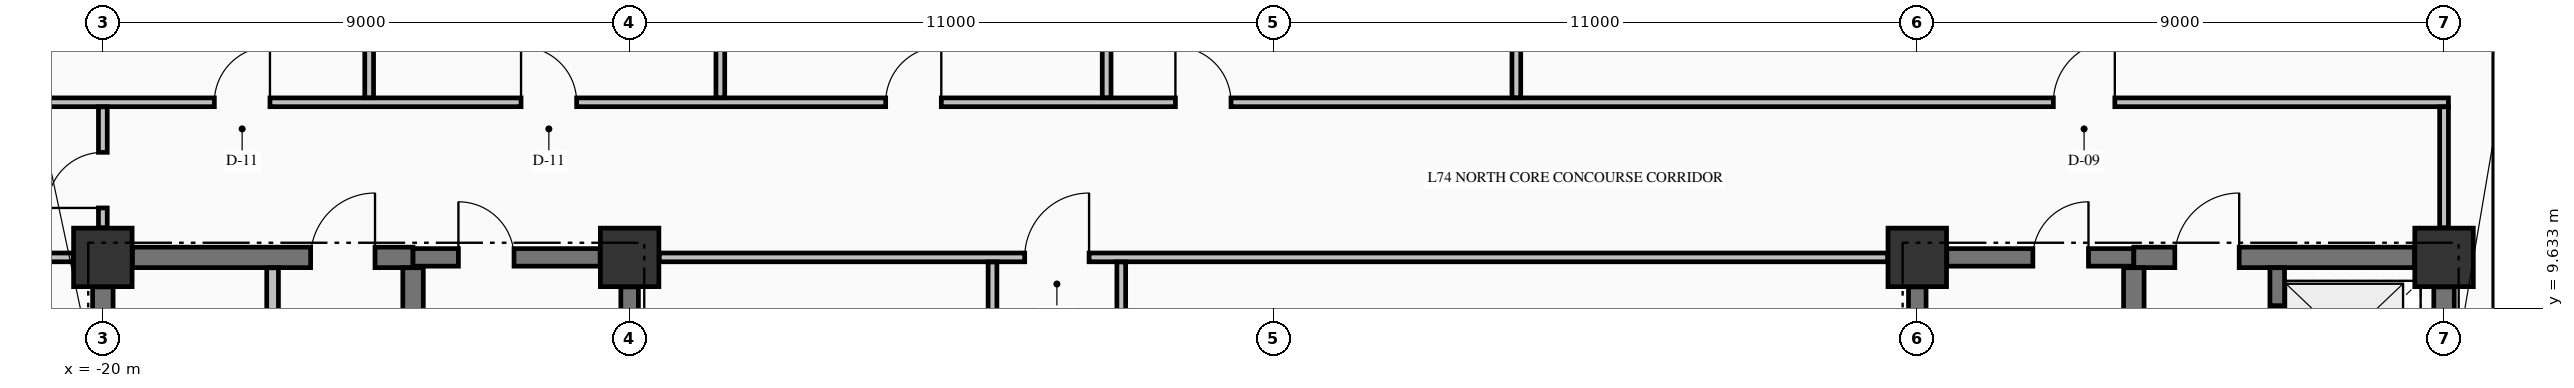
"""IFC4 building model, lengths in metres.
Left out: names, types, materials, properties, quantities, classifications, styles, units other than length and angle.
Written with IfcOpenShell. Run it as: python <this file> out.ifc"""

import sys

from ifc_helpers import new_model, si_unit, direction, frame, frame_2d, origin, origin_2d, place, context, subcontext, project, spatial, rectangle, extrude, element, fill, save


model = new_model("IFC4")
c1 = context("Model", 3, precision=1e-05, world=origin(), true_north=direction((0.0, 1.0)))
c2 = subcontext(c1, "Body", "Model", "MODEL_VIEW")
j1 = project(units=[si_unit("LENGTHUNIT", "METRE"), si_unit("PLANEANGLEUNIT", "RADIAN")], contexts=[c1])
p1 = place(None, origin())
s1 = spatial("IfcSite", under=j1, at=p1, CompositionType="ELEMENT")
p2 = place(p1, origin())
s2 = spatial("IfcBuilding", under=s1, at=p2, CompositionType="ELEMENT")
p3 = place(p2, frame((0.0, 0.0, 278.06)))
s3 = spatial("IfcBuildingStorey", under=s2, at=p3, CompositionType="ELEMENT", Elevation=278.06)
for number, where, z_axis, x_axis in (
    (1, (-20.0, 10.5, -0.425), (0.0, 0.0, 1.0), (1.0, 0.0, 0.0)),
    (2, (-11.0, 10.5, -0.425), (0.0, 0.0, 1.0), (1.0, 0.0, 0.0)),
    (3, (11.0, 10.5, -0.425), (0.0, 0.0, 1.0), (1.0, 0.0, 0.0)),
    (4, (20.0, 10.5, -0.425), (0.0, 0.0, 1.0), (1.0, 0.0, 0.0)),
):
    element("IfcColumn", number, at=place(p3, frame(where, z_axis=z_axis, x_axis=x_axis)), inside=s3, PredefinedType="COLUMN", context=c2, shape_type="SweptSolid", body=[
        extrude(rectangle(XDim=1.0, YDim=1.0, at=origin_2d()), origin(), (0.0, 0.0, 1.0), 3.84),
    ])
p4 = place(p3, frame((21.0, 9.455, 0.0), z_axis=(0.0, 0.0, 1.0), x_axis=(0.0, 1.0, 0.0)))
e5 = element("IfcWall", 5, at=p4, inside=s3, PredefinedType="STANDARD", context=c2, shape_type="SweptSolid", body=[
    extrude(rectangle(XDim=8.09, YDim=0.3, at=frame_2d((4.045, 0.0))), origin(), (0.0, 0.0, 1.0), 1.607),
])
p5 = place(p3, frame((-19.496, 10.5, 0.0), z_axis=(0.0, 0.0, 1.0), x_axis=(1.0, 0.0, 0.0)))
e6 = element("IfcWall", 6, at=p5, inside=s3, PredefinedType="SHEAR", context=c2, shape_type="SweptSolid", body=[
    extrude(rectangle(XDim=4.796, YDim=0.35, at=frame_2d((2.398, 0.0))), origin(), (0.0, 0.0, 1.0), 3.415),
])
p6 = place(p5, frame((3.046, 0.0, 0.0)))
e7 = element("IfcOpeningElement", 7, at=p6, cuts=e6, PredefinedType="OPENING", context=c2, shape_type="SweptSolid", body=[
    extrude(rectangle(XDim=1.1, YDim=2.15, at=frame_2d((0.55, 1.075))), frame((0.0, 0.185, 0.0), z_axis=(0.0, -1.0, 0.0), x_axis=(1.0, 0.0, 0.0)), (0.0, 0.0, 1.0), 0.37),
])
p7 = place(p3, frame((-14.7, 10.5, 0.0), z_axis=(0.0, 0.0, 1.0), x_axis=(1.0, 0.0, 0.0)))
e8 = element("IfcWall", 8, at=p7, inside=s3, PredefinedType="SHEAR", context=c2, shape_type="SweptSolid", body=[
    extrude(rectangle(XDim=3.196, YDim=0.3, at=frame_2d((1.598, 0.0))), origin(), (0.0, 0.0, 1.0), 3.415),
])
p8 = place(p7, frame((0.775, 0.0, 0.0)))
e9 = element("IfcOpeningElement", 9, at=p8, cuts=e8, PredefinedType="OPENING", context=c2, shape_type="SweptSolid", body=[
    extrude(rectangle(XDim=0.95, YDim=2.15, at=frame_2d((0.475, 1.075))), frame((0.0, 0.16, 0.0), z_axis=(0.0, -1.0, 0.0), x_axis=(1.0, 0.0, 0.0)), (0.0, 0.0, 1.0), 0.32),
])
p9 = place(p3, frame((11.504, 10.5, 0.0), z_axis=(0.0, 0.0, 1.0), x_axis=(1.0, 0.0, 0.0)))
e10 = element("IfcWall", 10, at=p9, inside=s3, PredefinedType="SHEAR", context=c2, shape_type="SweptSolid", body=[
    extrude(rectangle(XDim=3.196, YDim=0.3, at=frame_2d((1.598, 0.0))), origin(), (0.0, 0.0, 1.0), 3.415),
])
p10 = place(p9, frame((1.471, 0.0, 0.0)))
e11 = element("IfcOpeningElement", 11, at=p10, cuts=e10, PredefinedType="OPENING", context=c2, shape_type="SweptSolid", body=[
    extrude(rectangle(XDim=0.95, YDim=2.15, at=frame_2d((0.475, 1.075))), frame((0.0, 0.16, 0.0), z_axis=(0.0, -1.0, 0.0), x_axis=(1.0, 0.0, 0.0)), (0.0, 0.0, 1.0), 0.32),
])
p11 = place(p3, frame((14.7, 10.5, 0.0), z_axis=(0.0, 0.0, 1.0), x_axis=(1.0, 0.0, 0.0)))
e12 = element("IfcWall", 12, at=p11, inside=s3, PredefinedType="SHEAR", context=c2, shape_type="SweptSolid", body=[
    extrude(rectangle(XDim=4.796, YDim=0.35, at=frame_2d((2.398, 0.0))), origin(), (0.0, 0.0, 1.0), 3.415),
])
p12 = place(p11, frame((0.7, 0.0, 0.0)))
e13 = element("IfcOpeningElement", 13, at=p12, cuts=e12, PredefinedType="OPENING", context=c2, shape_type="SweptSolid", body=[
    extrude(rectangle(XDim=1.1, YDim=2.15, at=frame_2d((0.55, 1.075))), frame((0.0, 0.185, 0.0), z_axis=(0.0, -1.0, 0.0), x_axis=(1.0, 0.0, 0.0)), (0.0, 0.0, 1.0), 0.37),
])
p13 = place(p3, frame((-25.835, 10.5, 0.0), z_axis=(0.0, 0.0, 1.0), x_axis=(1.0, 0.0, 0.0)))
e14 = element("IfcWall", 14, at=p13, inside=s3, PredefinedType="PARTITIONING", context=c2, shape_type="SweptSolid", body=[
    extrude(rectangle(XDim=5.329, YDim=0.15, at=frame_2d((2.665, 0.0))), origin(), (0.0, 0.0, 1.0), 3.415),
])
p14 = place(p13, frame((2.36, 0.0, 0.0)))
e15 = element("IfcOpeningElement", 15, at=p14, cuts=e14, PredefinedType="OPENING", context=c2, shape_type="SweptSolid", body=[
    extrude(rectangle(XDim=0.95, YDim=2.15, at=frame_2d((0.475, 1.075))), frame((0.0, 0.085, 0.0), z_axis=(0.0, -1.0, 0.0), x_axis=(1.0, 0.0, 0.0)), (0.0, 0.0, 1.0), 0.17),
])
p15 = place(p3, frame((-10.494, 10.5, 0.0), z_axis=(0.0, 0.0, 1.0), x_axis=(1.0, 0.0, 0.0)))
e16 = element("IfcWall", 16, at=p15, inside=s3, PredefinedType="PARTITIONING", context=c2, shape_type="SweptSolid", body=[
    extrude(rectangle(XDim=20.988, YDim=0.15, at=frame_2d((10.494, 0.0))), origin(), (0.0, 0.0, 1.0), 3.415),
])
p16 = place(p15, frame((6.244, 0.0, 0.0)))
e17 = element("IfcOpeningElement", 17, at=p16, cuts=e16, PredefinedType="OPENING", context=c2, shape_type="SweptSolid", body=[
    extrude(rectangle(XDim=1.1, YDim=2.15, at=frame_2d((0.55, 1.075))), frame((0.0, 0.085, 0.0), z_axis=(0.0, -1.0, 0.0), x_axis=(1.0, 0.0, 0.0)), (0.0, 0.0, 1.0), 0.17),
])
p17 = place(p3, frame((-25.835, 13.15, 0.0), z_axis=(0.0, 0.0, 1.0), x_axis=(1.0, 0.0, 0.0)))
e18 = element("IfcWall", 18, at=p17, inside=s3, PredefinedType="PARTITIONING", context=c2, shape_type="SweptSolid", body=[
    extrude(rectangle(XDim=45.91, YDim=0.15, at=frame_2d((22.955, 0.0))), origin(), (0.0, 0.0, 1.0), 3.415),
])
p18 = place(p17, frame((7.74, 0.0, 0.0)))
e19 = element("IfcOpeningElement", 19, at=p18, cuts=e18, PredefinedType="OPENING", context=c2, shape_type="SweptSolid", body=[
    extrude(rectangle(XDim=0.95, YDim=2.15, at=frame_2d((0.475, 1.075))), frame((0.0, 0.085, 0.0), z_axis=(0.0, -1.0, 0.0), x_axis=(1.0, 0.0, 0.0)), (0.0, 0.0, 1.0), 0.17),
])
p19 = place(p17, frame((12.98, 0.0, 0.0)))
e20 = element("IfcOpeningElement", 20, at=p19, cuts=e18, PredefinedType="OPENING", context=c2, shape_type="SweptSolid", body=[
    extrude(rectangle(XDim=0.95, YDim=2.15, at=frame_2d((0.475, 1.075))), frame((0.0, 0.085, 0.0), z_axis=(0.0, -1.0, 0.0), x_axis=(1.0, 0.0, 0.0)), (0.0, 0.0, 1.0), 0.17),
])
p20 = place(p17, frame((19.21, 0.0, 0.0)))
e21 = element("IfcOpeningElement", 21, at=p20, cuts=e18, PredefinedType="OPENING", context=c2, shape_type="SweptSolid", body=[
    extrude(rectangle(XDim=0.95, YDim=2.15, at=frame_2d((0.475, 1.075))), frame((0.0, 0.085, 0.0), z_axis=(0.0, -1.0, 0.0), x_axis=(1.0, 0.0, 0.0)), (0.0, 0.0, 1.0), 0.17),
])
p21 = place(p17, frame((24.16, 0.0, 0.0)))
e22 = element("IfcOpeningElement", 22, at=p21, cuts=e18, PredefinedType="OPENING", context=c2, shape_type="SweptSolid", body=[
    extrude(rectangle(XDim=0.95, YDim=2.15, at=frame_2d((0.475, 1.075))), frame((0.0, 0.085, 0.0), z_axis=(0.0, -1.0, 0.0), x_axis=(1.0, 0.0, 0.0)), (0.0, 0.0, 1.0), 0.17),
])
p22 = place(p17, frame((39.16, 0.0, 0.0)))
e23 = element("IfcOpeningElement", 23, at=p22, cuts=e18, PredefinedType="OPENING", context=c2, shape_type="SweptSolid", body=[
    extrude(rectangle(XDim=1.05, YDim=2.15, at=frame_2d((0.525, 1.075))), frame((0.0, 0.085, 0.0), z_axis=(0.0, -1.0, 0.0), x_axis=(1.0, 0.0, 0.0)), (0.0, 0.0, 1.0), 0.17),
])
p23 = place(p3, frame((-20.0, 5.327, 0.0), z_axis=(0.0, 0.0, 1.0), x_axis=(0.0, 1.0, 0.0)))
e24 = element("IfcWall", 24, at=p23, inside=s3, PredefinedType="SHEAR", context=c2, shape_type="SweptSolid", body=[
    extrude(rectangle(XDim=4.669, YDim=0.35, at=frame_2d((2.334, 0.0))), origin(), (0.0, 0.0, 1.0), 3.415),
])
p24 = place(p3, frame((-14.7, 5.852, 0.0), z_axis=(0.0, 0.0, 1.0), x_axis=(0.0, 1.0, 0.0)))
e25 = element("IfcWall", 25, at=p24, inside=s3, PredefinedType="SHEAR", context=c2, shape_type="SweptSolid", body=[
    extrude(rectangle(XDim=4.471, YDim=0.35, at=frame_2d((2.235, 0.0))), origin(), (0.0, 0.0, 1.0), 3.415),
])
for number, where, z_axis, x_axis in (
    (26, (-11.0, 5.852, 0.0), (0.0, 0.0, 1.0), (0.0, 1.0, 0.0)),
    (27, (11.0, 5.852, 0.0), (0.0, 0.0, 1.0), (0.0, 1.0, 0.0)),
):
    element("IfcWall", number, at=place(p3, frame(where, z_axis=z_axis, x_axis=x_axis)), inside=s3, PredefinedType="SHEAR", context=c2, shape_type="SweptSolid", body=[
        extrude(rectangle(XDim=4.144, YDim=0.3, at=frame_2d((2.072, 0.0))), origin(), (0.0, 0.0, 1.0), 3.415),
    ])
p25 = place(p3, frame((14.7, 5.852, 0.0), z_axis=(0.0, 0.0, 1.0), x_axis=(0.0, 1.0, 0.0)))
e28 = element("IfcWall", 28, at=p25, inside=s3, PredefinedType="SHEAR", context=c2, shape_type="SweptSolid", body=[
    extrude(rectangle(XDim=4.471, YDim=0.35, at=frame_2d((2.235, 0.0))), origin(), (0.0, 0.0, 1.0), 3.415),
])
p26 = place(p3, frame((17.15, 7.877, 0.0), z_axis=(0.0, 0.0, 1.0), x_axis=(0.0, 1.0, 0.0)))
e29 = element("IfcWall", 29, at=p26, inside=s3, PredefinedType="SOLIDWALL", context=c2, shape_type="SweptSolid", body=[
    extrude(rectangle(XDim=2.446, YDim=0.25, at=frame_2d((1.223, 0.0))), origin(), (0.0, 0.0, 1.0), 3.415),
])
p27 = place(p26, frame((0.698, 0.0, 0.0)))
e30 = element("IfcOpeningElement", 30, at=p27, cuts=e29, PredefinedType="OPENING", context=c2, shape_type="SweptSolid", body=[
    extrude(rectangle(XDim=1.1, YDim=2.2, at=frame_2d((0.55, 1.1))), frame((0.0, 0.135, 0.0), z_axis=(0.0, -1.0, 0.0), x_axis=(1.0, 0.0, 0.0)), (0.0, 0.0, 1.0), 0.27),
])
p28 = place(p3, frame((20.0, 7.877, 0.0), z_axis=(0.0, 0.0, 1.0), x_axis=(0.0, 1.0, 0.0)))
e31 = element("IfcWall", 31, at=p28, inside=s3, PredefinedType="SHEAR", context=c2, shape_type="SweptSolid", body=[
    extrude(rectangle(XDim=2.119, YDim=0.35, at=frame_2d((1.06, 0.0))), origin(), (0.0, 0.0, 1.0), 3.415),
])
p29 = place(p3, frame((-20.0, 11.006, 0.0), z_axis=(0.0, 0.0, 1.0), x_axis=(0.0, 1.0, 0.0)))
e32 = element("IfcWall", 32, at=p29, inside=s3, PredefinedType="PARTITIONING", context=c2, shape_type="SweptSolid", body=[
    extrude(rectangle(XDim=2.066, YDim=0.15, at=frame_2d((1.033, 0.0))), origin(), (0.0, 0.0, 1.0), 3.415),
])
p30 = place(p29, frame((0.339, 0.0, 0.0)))
e33 = element("IfcOpeningElement", 33, at=p30, cuts=e32, PredefinedType="OPENING", context=c2, shape_type="SweptSolid", body=[
    extrude(rectangle(XDim=0.95, YDim=2.15, at=frame_2d((0.475, 1.075))), frame((0.0, 0.085, 0.0), z_axis=(0.0, -1.0, 0.0), x_axis=(1.0, 0.0, 0.0)), (0.0, 0.0, 1.0), 0.17),
])
p31 = place(p3, frame((-17.1, 5.328, 0.0), z_axis=(0.0, 0.0, 1.0), x_axis=(0.0, 1.0, 0.0)))
e34 = element("IfcWall", 34, at=p31, inside=s3, PredefinedType="PARTITIONING", context=c2, shape_type="SweptSolid", body=[
    extrude(rectangle(XDim=4.994, YDim=0.2, at=frame_2d((2.497, 0.0))), origin(), (0.0, 0.0, 1.0), 3.415),
])
p32 = place(p31, frame((2.072, 0.0, 0.0)))
e35 = element("IfcOpeningElement", 35, at=p32, cuts=e34, PredefinedType="OPENING", context=c2, shape_type="SweptSolid", body=[
    extrude(rectangle(XDim=0.9, YDim=2.15, at=frame_2d((0.45, 1.075))), frame((0.0, 0.11, 0.0), z_axis=(0.0, -1.0, 0.0), x_axis=(1.0, 0.0, 0.0)), (0.0, 0.0, 1.0), 0.22),
])
for number, where, z_axis, x_axis in (
    (36, (-15.45, 13.228, 0.0), (0.0, 0.0, 1.0), (0.0, 1.0, 0.0)),
    (37, (-9.45, 13.228, 0.0), (0.0, 0.0, 1.0), (0.0, 1.0, 0.0)),
):
    element("IfcWall", number, at=place(p3, frame(where, z_axis=z_axis, x_axis=x_axis)), inside=s3, PredefinedType="PARTITIONING", context=c2, shape_type="SweptSolid", body=[
        extrude(rectangle(XDim=10.107, YDim=0.15, at=frame_2d((5.053, 0.0))), origin(), (0.0, 0.0, 1.0), 3.415),
    ])
p33 = place(p3, frame((-4.8, 2.978, 0.0), z_axis=(0.0, 0.0, 1.0), x_axis=(0.0, 1.0, 0.0)))
e38 = element("IfcWall", 38, at=p33, inside=s3, PredefinedType="PARTITIONING", context=c2, shape_type="SweptSolid", body=[
    extrude(rectangle(XDim=7.444, YDim=0.15, at=frame_2d((3.722, 0.0))), origin(), (0.0, 0.0, 1.0), 3.415),
])
p34 = place(p3, frame((-2.85, 13.228, 0.0), z_axis=(0.0, 0.0, 1.0), x_axis=(0.0, 1.0, 0.0)))
e39 = element("IfcWall", 39, at=p34, inside=s3, PredefinedType="PARTITIONING", context=c2, shape_type="SweptSolid", body=[
    extrude(rectangle(XDim=10.107, YDim=0.15, at=frame_2d((5.053, 0.0))), origin(), (0.0, 0.0, 1.0), 3.415),
])
p35 = place(p3, frame((-2.6, 2.978, 0.0), z_axis=(0.0, 0.0, 1.0), x_axis=(0.0, 1.0, 0.0)))
e40 = element("IfcWall", 40, at=p35, inside=s3, PredefinedType="PARTITIONING", context=c2, shape_type="SweptSolid", body=[
    extrude(rectangle(XDim=7.444, YDim=0.15, at=frame_2d((3.722, 0.0))), origin(), (0.0, 0.0, 1.0), 3.415),
])
p36 = place(p3, frame((4.15, 13.228, 0.0), z_axis=(0.0, 0.0, 1.0), x_axis=(0.0, 1.0, 0.0)))
e41 = element("IfcWall", 41, at=p36, inside=s3, PredefinedType="PARTITIONING", context=c2, shape_type="SweptSolid", body=[
    extrude(rectangle(XDim=10.107, YDim=0.15, at=frame_2d((5.053, 0.0))), origin(), (0.0, 0.0, 1.0), 3.415),
])
p37 = place(p3, frame((20.0, 11.006, 0.0), z_axis=(0.0, 0.0, 1.0), x_axis=(0.0, 1.0, 0.0)))
e42 = element("IfcWall", 42, at=p37, inside=s3, PredefinedType="PARTITIONING", context=c2, shape_type="SweptSolid", body=[
    extrude(rectangle(XDim=2.066, YDim=0.15, at=frame_2d((1.033, 0.0))), origin(), (0.0, 0.0, 1.0), 3.005),
])
p38 = place(p8, origin())
e43 = element("IfcDoor", 43, at=p38, inside=s3, OperationType="SINGLE_SWING_LEFT", PredefinedType="DOOR", context=c2, shape_type="SweptSolid", body=[
    extrude(rectangle(XDim=0.95, YDim=2.15, at=frame_2d((0.475, 1.075))), frame((0.0, 0.025, 0.0), z_axis=(0.0, -1.0, 0.0), x_axis=(1.0, 0.0, 0.0)), (0.0, 0.0, 1.0), 0.05),
])
fill(e9, e43)
p39 = place(p10, origin())
e44 = element("IfcDoor", 44, at=p39, inside=s3, OperationType="SINGLE_SWING_RIGHT", PredefinedType="DOOR", context=c2, shape_type="SweptSolid", body=[
    extrude(rectangle(XDim=0.95, YDim=2.15, at=frame_2d((0.475, 1.075))), frame((0.0, 0.025, 0.0), z_axis=(0.0, -1.0, 0.0), x_axis=(1.0, 0.0, 0.0)), (0.0, 0.0, 1.0), 0.05),
])
fill(e11, e44)
p40 = place(p6, origin())
e45 = element("IfcDoor", 45, at=p40, inside=s3, OperationType="SINGLE_SWING_RIGHT", PredefinedType="DOOR", context=c2, shape_type="SweptSolid", body=[
    extrude(rectangle(XDim=1.1, YDim=2.15, at=frame_2d((0.55, 1.075))), frame((0.0, 0.025, 0.0), z_axis=(0.0, -1.0, 0.0), x_axis=(1.0, 0.0, 0.0)), (0.0, 0.0, 1.0), 0.05),
])
fill(e7, e45)
p41 = place(p27, origin())
e46 = element("IfcDoor", 46, at=p41, inside=s3, OperationType="SLIDING_TO_RIGHT", PredefinedType="DOOR", context=c2, shape_type="SweptSolid", body=[
    extrude(rectangle(XDim=1.1, YDim=2.2, at=frame_2d((0.55, 1.1))), frame((0.0, 0.025, 0.0), z_axis=(0.0, -1.0, 0.0), x_axis=(1.0, 0.0, 0.0)), (0.0, 0.0, 1.0), 0.05),
])
fill(e30, e46)
p42 = place(p12, origin())
e47 = element("IfcDoor", 47, at=p42, inside=s3, OperationType="SINGLE_SWING_RIGHT", PredefinedType="DOOR", context=c2, shape_type="SweptSolid", body=[
    extrude(rectangle(XDim=1.1, YDim=2.15, at=frame_2d((0.55, 1.075))), frame((0.0, 0.025, 0.0), z_axis=(0.0, -1.0, 0.0), x_axis=(1.0, 0.0, 0.0)), (0.0, 0.0, 1.0), 0.05),
])
fill(e13, e47)
p43 = place(p16, origin())
e48 = element("IfcDoor", 48, at=p43, inside=s3, OperationType="SINGLE_SWING_RIGHT", PredefinedType="DOOR", context=c2, shape_type="SweptSolid", body=[
    extrude(rectangle(XDim=1.1, YDim=2.15, at=frame_2d((0.55, 1.075))), frame((0.0, 0.025, 0.0), z_axis=(0.0, -1.0, 0.0), x_axis=(1.0, 0.0, 0.0)), (0.0, 0.0, 1.0), 0.05),
])
fill(e17, e48)
p44 = place(p18, origin())
e49 = element("IfcDoor", 49, at=p44, inside=s3, OperationType="SINGLE_SWING_RIGHT", PredefinedType="DOOR", context=c2, shape_type="SweptSolid", body=[
    extrude(rectangle(XDim=0.95, YDim=2.15, at=frame_2d((0.475, 1.075))), frame((0.0, 0.025, 0.0), z_axis=(0.0, -1.0, 0.0), x_axis=(1.0, 0.0, 0.0)), (0.0, 0.0, 1.0), 0.05),
])
fill(e19, e49)
p45 = place(p19, origin())
e50 = element("IfcDoor", 50, at=p45, inside=s3, OperationType="SINGLE_SWING_LEFT", PredefinedType="DOOR", context=c2, shape_type="SweptSolid", body=[
    extrude(rectangle(XDim=0.95, YDim=2.15, at=frame_2d((0.475, 1.075))), frame((0.0, 0.025, 0.0), z_axis=(0.0, -1.0, 0.0), x_axis=(1.0, 0.0, 0.0)), (0.0, 0.0, 1.0), 0.05),
])
fill(e20, e50)
p46 = place(p20, origin())
e51 = element("IfcDoor", 51, at=p46, inside=s3, OperationType="SINGLE_SWING_RIGHT", PredefinedType="DOOR", context=c2, shape_type="SweptSolid", body=[
    extrude(rectangle(XDim=0.95, YDim=2.15, at=frame_2d((0.475, 1.075))), frame((0.0, 0.025, 0.0), z_axis=(0.0, -1.0, 0.0), x_axis=(1.0, 0.0, 0.0)), (0.0, 0.0, 1.0), 0.05),
])
fill(e21, e51)
p47 = place(p21, origin())
e52 = element("IfcDoor", 52, at=p47, inside=s3, OperationType="SINGLE_SWING_LEFT", PredefinedType="DOOR", context=c2, shape_type="SweptSolid", body=[
    extrude(rectangle(XDim=0.95, YDim=2.15, at=frame_2d((0.475, 1.075))), frame((0.0, 0.025, 0.0), z_axis=(0.0, -1.0, 0.0), x_axis=(1.0, 0.0, 0.0)), (0.0, 0.0, 1.0), 0.05),
])
fill(e22, e52)
p48 = place(p22, origin())
e53 = element("IfcDoor", 53, at=p48, inside=s3, OperationType="SINGLE_SWING_RIGHT", PredefinedType="DOOR", context=c2, shape_type="SweptSolid", body=[
    extrude(rectangle(XDim=1.05, YDim=2.15, at=frame_2d((0.525, 1.075))), frame((0.0, 0.025, 0.0), z_axis=(0.0, -1.0, 0.0), x_axis=(1.0, 0.0, 0.0)), (0.0, 0.0, 1.0), 0.05),
])
fill(e23, e53)
p49 = place(p30, origin())
e54 = element("IfcDoor", 54, at=p49, inside=s3, OperationType="SINGLE_SWING_LEFT", PredefinedType="DOOR", context=c2, shape_type="SweptSolid", body=[
    extrude(rectangle(XDim=0.95, YDim=2.15, at=frame_2d((0.475, 1.075))), frame((0.0, 0.025, 0.0), z_axis=(0.0, -1.0, 0.0), x_axis=(1.0, 0.0, 0.0)), (0.0, 0.0, 1.0), 0.05),
])
fill(e33, e54)
save(model, sys.argv[1])
